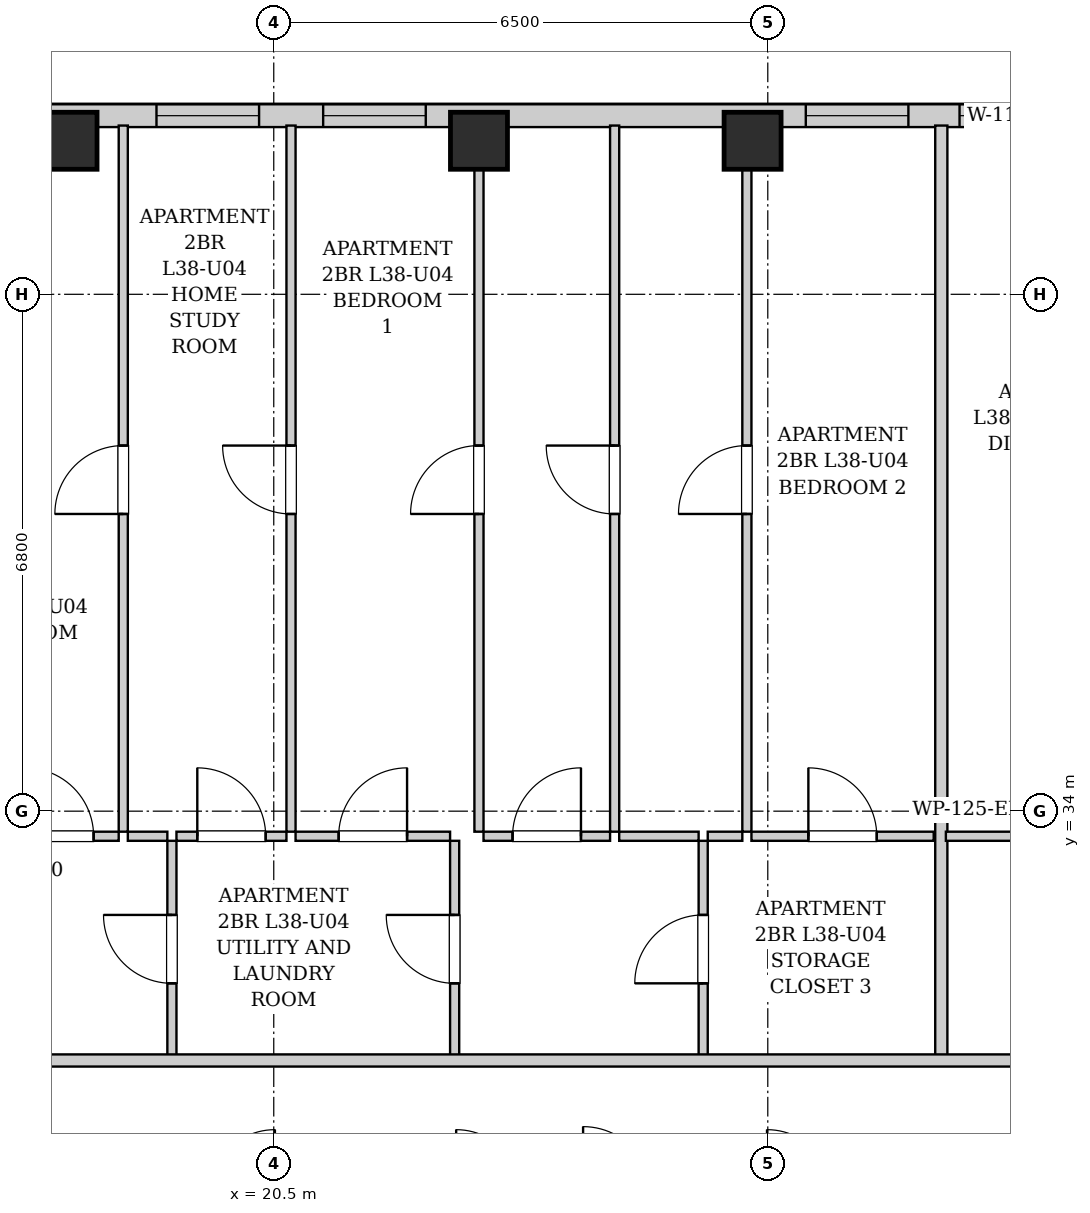
"""IFC4 building model, lengths in metres.
Left out: names, types, materials, properties, quantities, classifications, styles, units other than length and angle.
Written with IfcOpenShell. Run it as: python <this file> out.ifc"""

import sys

from ifc_helpers import new_model, si_unit, direction, frame, frame_2d, origin, origin_2d, place, context, subcontext, project, spatial, rectangle, extrude, element, fill, save


model = new_model("IFC4")
c1 = context("Model", 3, precision=1e-05, world=origin(), true_north=direction((0.0, 1.0)))
c2 = subcontext(c1, "Body", "Model", "MODEL_VIEW")
j1 = project(units=[si_unit("LENGTHUNIT", "METRE"), si_unit("PLANEANGLEUNIT", "RADIAN")], contexts=[c1])
p1 = place(None, origin())
s1 = spatial("IfcSite", under=j1, at=p1, CompositionType="ELEMENT")
p2 = place(p1, origin())
s2 = spatial("IfcBuilding", under=s1, at=p2, CompositionType="ELEMENT")
p3 = place(p2, frame((0.0, 0.0, 134.15)))
s3 = spatial("IfcBuildingStorey", under=s2, at=p3, CompositionType="ELEMENT", Elevation=134.15)
for number, where, z_axis, x_axis in (
    (1, (17.8, 42.82, 0.0), (0.0, 0.0, 1.0), (1.0, 0.0, 0.0)),
    (2, (23.2, 42.82, 0.0), (0.0, 0.0, 1.0), (1.0, 0.0, 0.0)),
    (3, (26.8, 42.82, 0.0), (0.0, 0.0, 1.0), (1.0, 0.0, 0.0)),
):
    element("IfcColumn", number, at=place(p3, frame(where, z_axis=z_axis, x_axis=x_axis)), inside=s3, PredefinedType="COLUMN", context=c2, shape_type="SweptSolid", body=[
        extrude(rectangle(XDim=0.75, YDim=0.75, at=origin_2d()), origin(), (0.0, 0.0, 1.0), 3.25),
    ])
p4 = place(p3, frame((16.6, 43.15, 0.0), z_axis=(0.0, 0.0, 1.0), x_axis=(1.0, 0.0, 0.0)))
e4 = element("IfcWall", 4, at=p4, inside=s3, PredefinedType="SOLIDWALL", context=c2, shape_type="SweptSolid", body=[
    extrude(rectangle(XDim=14.1, YDim=0.3, at=frame_2d((7.05, 0.0))), origin(), (0.0, 0.0, 1.0), 2.99),
])
p5 = place(p4, frame((2.357, 0.0, 0.55)))
e5 = element("IfcOpeningElement", 5, at=p5, cuts=e4, PredefinedType="OPENING", context=c2, shape_type="SweptSolid", body=[
    extrude(rectangle(XDim=1.35, YDim=1.2, at=frame_2d((0.675, 0.6))), frame((0.0, 0.16, 0.0), z_axis=(0.0, -1.0, 0.0), x_axis=(1.0, 0.0, 0.0)), (0.0, 0.0, 1.0), 0.32),
])
p6 = place(p4, frame((4.55, 0.0, 0.55)))
e6 = element("IfcOpeningElement", 6, at=p6, cuts=e4, PredefinedType="OPENING", context=c2, shape_type="SweptSolid", body=[
    extrude(rectangle(XDim=1.35, YDim=1.2, at=frame_2d((0.675, 0.6))), frame((0.0, 0.16, 0.0), z_axis=(0.0, -1.0, 0.0), x_axis=(1.0, 0.0, 0.0)), (0.0, 0.0, 1.0), 0.32),
])
p7 = place(p4, frame((10.9, 0.0, 0.55)))
e7 = element("IfcOpeningElement", 7, at=p7, cuts=e4, PredefinedType="OPENING", context=c2, shape_type="SweptSolid", body=[
    extrude(rectangle(XDim=1.35, YDim=1.2, at=frame_2d((0.675, 0.6))), frame((0.0, 0.16, 0.0), z_axis=(0.0, -1.0, 0.0), x_axis=(1.0, 0.0, 0.0)), (0.0, 0.0, 1.0), 0.32),
])
p8 = place(p4, frame((12.923, 0.0, 0.55)))
e8 = element("IfcOpeningElement", 8, at=p8, cuts=e4, PredefinedType="OPENING", context=c2, shape_type="SweptSolid", body=[
    extrude(rectangle(XDim=0.85, YDim=1.2, at=frame_2d((0.425, 0.6))), frame((0.0, 0.16, 0.0), z_axis=(0.0, -1.0, 0.0), x_axis=(1.0, 0.0, 0.0)), (0.0, 0.0, 1.0), 0.32),
])
p9 = place(p3, frame((19.16, 30.76, 0.0), z_axis=(0.0, 0.0, 1.0), x_axis=(0.0, 1.0, 0.0)))
e9 = element("IfcWall", 9, at=p9, inside=s3, PredefinedType="PARTITIONING", context=c2, shape_type="SweptSolid", body=[
    extrude(rectangle(XDim=2.85, YDim=0.12, at=frame_2d((1.425, 0.0))), origin(), (0.0, 0.0, 1.0), 2.99),
])
p10 = place(p9, frame((0.975, 0.0, 0.0)))
e10 = element("IfcOpeningElement", 10, at=p10, cuts=e9, PredefinedType="OPENING", context=c2, shape_type="SweptSolid", body=[
    extrude(rectangle(XDim=0.9, YDim=2.05, at=frame_2d((0.45, 1.025))), frame((0.0, 0.07, 0.0), z_axis=(0.0, -1.0, 0.0), x_axis=(1.0, 0.0, 0.0)), (0.0, 0.0, 1.0), 0.14),
])
p11 = place(p3, frame((16.9, 33.67, 0.0), z_axis=(0.0, 0.0, 1.0), x_axis=(1.0, 0.0, 0.0)))
e11 = element("IfcWall", 11, at=p11, inside=s3, PredefinedType="PARTITIONING", context=c2, shape_type="SweptSolid", body=[
    extrude(rectangle(XDim=1.56, YDim=0.12, at=frame_2d((0.78, 0.0))), origin(), (0.0, 0.0, 1.0), 2.99),
])
p12 = place(p11, frame((0.33, 0.0, 0.0)))
e12 = element("IfcOpeningElement", 12, at=p12, cuts=e11, PredefinedType="OPENING", context=c2, shape_type="SweptSolid", body=[
    extrude(rectangle(XDim=0.9, YDim=2.05, at=frame_2d((0.45, 1.025))), frame((0.0, 0.07, 0.0), z_axis=(0.0, -1.0, 0.0), x_axis=(1.0, 0.0, 0.0)), (0.0, 0.0, 1.0), 0.14),
])
p13 = place(p3, frame((18.58, 33.67, 0.0), z_axis=(0.0, 0.0, 1.0), x_axis=(1.0, 0.0, 0.0)))
e13 = element("IfcWall", 13, at=p13, inside=s3, PredefinedType="PARTITIONING", context=c2, shape_type="SweptSolid", body=[
    extrude(rectangle(XDim=0.52, YDim=0.12, at=frame_2d((0.26, 0.0))), origin(), (0.0, 0.0, 1.0), 2.99),
])
p14 = place(p3, frame((22.88, 30.76, 0.0), z_axis=(0.0, 0.0, 1.0), x_axis=(0.0, 1.0, 0.0)))
e14 = element("IfcWall", 14, at=p14, inside=s3, PredefinedType="PARTITIONING", context=c2, shape_type="SweptSolid", body=[
    extrude(rectangle(XDim=2.85, YDim=0.12, at=frame_2d((1.425, 0.0))), origin(), (0.0, 0.0, 1.0), 2.99),
])
p15 = place(p14, frame((0.975, 0.0, 0.0)))
e15 = element("IfcOpeningElement", 15, at=p15, cuts=e14, PredefinedType="OPENING", context=c2, shape_type="SweptSolid", body=[
    extrude(rectangle(XDim=0.9, YDim=2.05, at=frame_2d((0.45, 1.025))), frame((0.0, 0.07, 0.0), z_axis=(0.0, -1.0, 0.0), x_axis=(1.0, 0.0, 0.0)), (0.0, 0.0, 1.0), 0.14),
])
p16 = place(p3, frame((19.22, 33.67, 0.0), z_axis=(0.0, 0.0, 1.0), x_axis=(1.0, 0.0, 0.0)))
e16 = element("IfcWall", 16, at=p16, inside=s3, PredefinedType="PARTITIONING", context=c2, shape_type="SweptSolid", body=[
    extrude(rectangle(XDim=1.447, YDim=0.12, at=frame_2d((0.724, 0.0))), origin(), (0.0, 0.0, 1.0), 2.99),
])
p17 = place(p16, frame((0.274, 0.0, 0.0)))
e17 = element("IfcOpeningElement", 17, at=p17, cuts=e16, PredefinedType="OPENING", context=c2, shape_type="SweptSolid", body=[
    extrude(rectangle(XDim=0.9, YDim=2.05, at=frame_2d((0.45, 1.025))), frame((0.0, 0.07, 0.0), z_axis=(0.0, -1.0, 0.0), x_axis=(1.0, 0.0, 0.0)), (0.0, 0.0, 1.0), 0.14),
])
p18 = place(p3, frame((20.787, 33.67, 0.0), z_axis=(0.0, 0.0, 1.0), x_axis=(1.0, 0.0, 0.0)))
e18 = element("IfcWall", 18, at=p18, inside=s3, PredefinedType="PARTITIONING", context=c2, shape_type="SweptSolid", body=[
    extrude(rectangle(XDim=2.033, YDim=0.12, at=frame_2d((1.017, 0.0))), origin(), (0.0, 0.0, 1.0), 2.99),
])
p19 = place(p18, frame((0.567, 0.0, 0.0)))
e19 = element("IfcOpeningElement", 19, at=p19, cuts=e18, PredefinedType="OPENING", context=c2, shape_type="SweptSolid", body=[
    extrude(rectangle(XDim=0.9, YDim=2.05, at=frame_2d((0.45, 1.025))), frame((0.0, 0.07, 0.0), z_axis=(0.0, -1.0, 0.0), x_axis=(1.0, 0.0, 0.0)), (0.0, 0.0, 1.0), 0.14),
])
p20 = place(p3, frame((26.15, 30.76, 0.0), z_axis=(0.0, 0.0, 1.0), x_axis=(0.0, 1.0, 0.0)))
e20 = element("IfcWall", 20, at=p20, inside=s3, PredefinedType="PARTITIONING", context=c2, shape_type="SweptSolid", body=[
    extrude(rectangle(XDim=2.85, YDim=0.12, at=frame_2d((1.425, 0.0))), origin(), (0.0, 0.0, 1.0), 2.99),
])
p21 = place(p20, frame((0.975, 0.0, 0.0)))
e21 = element("IfcOpeningElement", 21, at=p21, cuts=e20, PredefinedType="OPENING", context=c2, shape_type="SweptSolid", body=[
    extrude(rectangle(XDim=0.9, YDim=2.05, at=frame_2d((0.45, 1.025))), frame((0.0, 0.07, 0.0), z_axis=(0.0, -1.0, 0.0), x_axis=(1.0, 0.0, 0.0)), (0.0, 0.0, 1.0), 0.14),
])
p22 = place(p3, frame((23.26, 33.67, 0.0), z_axis=(0.0, 0.0, 1.0), x_axis=(1.0, 0.0, 0.0)))
e22 = element("IfcWall", 22, at=p22, inside=s3, PredefinedType="PARTITIONING", context=c2, shape_type="SweptSolid", body=[
    extrude(rectangle(XDim=1.665, YDim=0.12, at=frame_2d((0.833, 0.0))), origin(), (0.0, 0.0, 1.0), 2.99),
])
p23 = place(p22, frame((0.382, 0.0, 0.0)))
e23 = element("IfcOpeningElement", 23, at=p23, cuts=e22, PredefinedType="OPENING", context=c2, shape_type="SweptSolid", body=[
    extrude(rectangle(XDim=0.9, YDim=2.05, at=frame_2d((0.45, 1.025))), frame((0.0, 0.07, 0.0), z_axis=(0.0, -1.0, 0.0), x_axis=(1.0, 0.0, 0.0)), (0.0, 0.0, 1.0), 0.14),
])
p24 = place(p3, frame((25.045, 33.67, 0.0), z_axis=(0.0, 0.0, 1.0), x_axis=(1.0, 0.0, 0.0)))
e24 = element("IfcWall", 24, at=p24, inside=s3, PredefinedType="PARTITIONING", context=c2, shape_type="SweptSolid", body=[
    extrude(rectangle(XDim=1.045, YDim=0.12, at=frame_2d((0.522, 0.0))), origin(), (0.0, 0.0, 1.0), 2.99),
])
p25 = place(p3, frame((26.21, 33.67, 0.0), z_axis=(0.0, 0.0, 1.0), x_axis=(1.0, 0.0, 0.0)))
e25 = element("IfcWall", 25, at=p25, inside=s3, PredefinedType="PARTITIONING", context=c2, shape_type="SweptSolid", body=[
    extrude(rectangle(XDim=0.455, YDim=0.12, at=frame_2d((0.228, 0.0))), origin(), (0.0, 0.0, 1.0), 2.99),
])
p26 = place(p3, frame((26.785, 33.67, 0.0), z_axis=(0.0, 0.0, 1.0), x_axis=(1.0, 0.0, 0.0)))
e26 = element("IfcWall", 26, at=p26, inside=s3, PredefinedType="PARTITIONING", context=c2, shape_type="SweptSolid", body=[
    extrude(rectangle(XDim=2.398, YDim=0.12, at=frame_2d((1.199, 0.0))), origin(), (0.0, 0.0, 1.0), 2.99),
])
p27 = place(p26, frame((0.749, 0.0, 0.0)))
e27 = element("IfcOpeningElement", 27, at=p27, cuts=e26, PredefinedType="OPENING", context=c2, shape_type="SweptSolid", body=[
    extrude(rectangle(XDim=0.9, YDim=2.05, at=frame_2d((0.45, 1.025))), frame((0.0, 0.07, 0.0), z_axis=(0.0, -1.0, 0.0), x_axis=(1.0, 0.0, 0.0)), (0.0, 0.0, 1.0), 0.14),
])
p28 = place(p3, frame((18.52, 33.73, 0.0), z_axis=(0.0, 0.0, 1.0), x_axis=(0.0, 1.0, 0.0)))
e28 = element("IfcWall", 28, at=p28, inside=s3, PredefinedType="PARTITIONING", context=c2, shape_type="SweptSolid", body=[
    extrude(rectangle(XDim=9.29, YDim=0.12, at=frame_2d((4.645, 0.0))), origin(), (0.0, 0.0, 1.0), 2.99),
])
p29 = place(p28, frame((4.18, 0.0, 0.0)))
e29 = element("IfcOpeningElement", 29, at=p29, cuts=e28, PredefinedType="OPENING", context=c2, shape_type="SweptSolid", body=[
    extrude(rectangle(XDim=0.9, YDim=2.05, at=frame_2d((0.45, 1.025))), frame((0.0, 0.07, 0.0), z_axis=(0.0, -1.0, 0.0), x_axis=(1.0, 0.0, 0.0)), (0.0, 0.0, 1.0), 0.14),
])
p30 = place(p3, frame((20.727, 33.73, 0.0), z_axis=(0.0, 0.0, 1.0), x_axis=(0.0, 1.0, 0.0)))
e30 = element("IfcWall", 30, at=p30, inside=s3, PredefinedType="PARTITIONING", context=c2, shape_type="SweptSolid", body=[
    extrude(rectangle(XDim=9.29, YDim=0.12, at=frame_2d((4.645, 0.0))), origin(), (0.0, 0.0, 1.0), 2.99),
])
p31 = place(p30, frame((4.18, 0.0, 0.0)))
e31 = element("IfcOpeningElement", 31, at=p31, cuts=e30, PredefinedType="OPENING", context=c2, shape_type="SweptSolid", body=[
    extrude(rectangle(XDim=0.9, YDim=2.05, at=frame_2d((0.45, 1.025))), frame((0.0, 0.07, 0.0), z_axis=(0.0, -1.0, 0.0), x_axis=(1.0, 0.0, 0.0)), (0.0, 0.0, 1.0), 0.14),
])
p32 = place(p3, frame((23.2, 33.73, 0.0), z_axis=(0.0, 0.0, 1.0), x_axis=(0.0, 1.0, 0.0)))
e32 = element("IfcWall", 32, at=p32, inside=s3, PredefinedType="PARTITIONING", context=c2, shape_type="SweptSolid", body=[
    extrude(rectangle(XDim=9.29, YDim=0.12, at=frame_2d((4.645, 0.0))), origin(), (0.0, 0.0, 1.0), 2.99),
])
p33 = place(p32, frame((4.18, 0.0, 0.0)))
e33 = element("IfcOpeningElement", 33, at=p33, cuts=e32, PredefinedType="OPENING", context=c2, shape_type="SweptSolid", body=[
    extrude(rectangle(XDim=0.9, YDim=2.05, at=frame_2d((0.45, 1.025))), frame((0.0, 0.07, 0.0), z_axis=(0.0, -1.0, 0.0), x_axis=(1.0, 0.0, 0.0)), (0.0, 0.0, 1.0), 0.14),
])
p34 = place(p3, frame((24.985, 33.73, 0.0), z_axis=(0.0, 0.0, 1.0), x_axis=(0.0, 1.0, 0.0)))
e34 = element("IfcWall", 34, at=p34, inside=s3, PredefinedType="PARTITIONING", context=c2, shape_type="SweptSolid", body=[
    extrude(rectangle(XDim=9.29, YDim=0.12, at=frame_2d((4.645, 0.0))), origin(), (0.0, 0.0, 1.0), 2.99),
])
p35 = place(p34, frame((4.18, 0.0, 0.0)))
e35 = element("IfcOpeningElement", 35, at=p35, cuts=e34, PredefinedType="OPENING", context=c2, shape_type="SweptSolid", body=[
    extrude(rectangle(XDim=0.9, YDim=2.05, at=frame_2d((0.45, 1.025))), frame((0.0, 0.07, 0.0), z_axis=(0.0, -1.0, 0.0), x_axis=(1.0, 0.0, 0.0)), (0.0, 0.0, 1.0), 0.14),
])
p36 = place(p3, frame((26.725, 33.73, 0.0), z_axis=(0.0, 0.0, 1.0), x_axis=(0.0, 1.0, 0.0)))
e36 = element("IfcWall", 36, at=p36, inside=s3, PredefinedType="PARTITIONING", context=c2, shape_type="SweptSolid", body=[
    extrude(rectangle(XDim=9.29, YDim=0.12, at=frame_2d((4.645, 0.0))), origin(), (0.0, 0.0, 1.0), 2.99),
])
p37 = place(p36, frame((4.18, 0.0, 0.0)))
e37 = element("IfcOpeningElement", 37, at=p37, cuts=e36, PredefinedType="OPENING", context=c2, shape_type="SweptSolid", body=[
    extrude(rectangle(XDim=0.9, YDim=2.05, at=frame_2d((0.45, 1.025))), frame((0.0, 0.07, 0.0), z_axis=(0.0, -1.0, 0.0), x_axis=(1.0, 0.0, 0.0)), (0.0, 0.0, 1.0), 0.14),
])
p38 = place(p3, frame((29.283, 30.76, 0.0), z_axis=(0.0, 0.0, 1.0), x_axis=(0.0, 1.0, 0.0)))
e38 = element("IfcWall", 38, at=p38, inside=s3, PredefinedType="PARTITIONING", context=c2, shape_type="SweptSolid", body=[
    extrude(rectangle(XDim=12.26, YDim=0.16, at=frame_2d((6.13, 0.0))), origin(), (0.0, 0.0, 1.0), 2.99),
])
p39 = place(p3, frame((29.343, 33.67, 0.0), z_axis=(0.0, 0.0, 1.0), x_axis=(1.0, 0.0, 0.0)))
e39 = element("IfcWall", 39, at=p39, inside=s3, PredefinedType="PARTITIONING", context=c2, shape_type="SweptSolid", body=[
    extrude(rectangle(XDim=2.4, YDim=0.12, at=frame_2d((1.2, 0.0))), origin(), (0.0, 0.0, 1.0), 2.99),
])
p40 = place(p3, frame((10.05, 30.72, 0.0), z_axis=(0.0, 0.0, 1.0), x_axis=(1.0, 0.0, 0.0)))
e40 = element("IfcWall", 40, at=p40, inside=s3, PredefinedType="PARTITIONING", context=c2, shape_type="SweptSolid", body=[
    extrude(rectangle(XDim=27.7, YDim=0.16, at=frame_2d((13.85, 0.0))), origin(), (0.0, 0.0, 1.0), 2.99),
])
p41 = place(p40, frame((4.165, 0.0, 0.0)))
e41 = element("IfcOpeningElement", 41, at=p41, cuts=e40, PredefinedType="OPENING", context=c2, shape_type="SweptSolid", body=[
    extrude(rectangle(XDim=0.95, YDim=2.1, at=frame_2d((0.475, 1.05))), frame((0.0, 0.09, 0.0), z_axis=(0.0, -1.0, 0.0), x_axis=(1.0, 0.0, 0.0)), (0.0, 0.0, 1.0), 0.18),
])
p42 = place(p40, frame((23.785, 0.0, 0.0)))
e42 = element("IfcOpeningElement", 42, at=p42, cuts=e40, PredefinedType="OPENING", context=c2, shape_type="SweptSolid", body=[
    extrude(rectangle(XDim=0.95, YDim=2.1, at=frame_2d((0.475, 1.05))), frame((0.0, 0.09, 0.0), z_axis=(0.0, -1.0, 0.0), x_axis=(1.0, 0.0, 0.0)), (0.0, 0.0, 1.0), 0.18),
])
p43 = place(p10, origin())
e43 = element("IfcDoor", 43, at=p43, inside=s3, OperationType="SINGLE_SWING_RIGHT", PredefinedType="DOOR", context=c2, shape_type="SweptSolid", body=[
    extrude(rectangle(XDim=0.9, YDim=2.05, at=frame_2d((0.45, 1.025))), frame((0.0, 0.025, 0.0), z_axis=(0.0, -1.0, 0.0), x_axis=(1.0, 0.0, 0.0)), (0.0, 0.0, 1.0), 0.05),
])
fill(e10, e43)
p44 = place(p12, origin())
e44 = element("IfcDoor", 44, at=p44, inside=s3, OperationType="SINGLE_SWING_LEFT", PredefinedType="DOOR", context=c2, shape_type="SweptSolid", body=[
    extrude(rectangle(XDim=0.9, YDim=2.05, at=frame_2d((0.45, 1.025))), frame((0.0, 0.025, 0.0), z_axis=(0.0, -1.0, 0.0), x_axis=(1.0, 0.0, 0.0)), (0.0, 0.0, 1.0), 0.05),
])
fill(e12, e44)
p45 = place(p15, origin())
e45 = element("IfcDoor", 45, at=p45, inside=s3, OperationType="SINGLE_SWING_RIGHT", PredefinedType="DOOR", context=c2, shape_type="SweptSolid", body=[
    extrude(rectangle(XDim=0.9, YDim=2.05, at=frame_2d((0.45, 1.025))), frame((0.0, 0.025, 0.0), z_axis=(0.0, -1.0, 0.0), x_axis=(1.0, 0.0, 0.0)), (0.0, 0.0, 1.0), 0.05),
])
fill(e15, e45)
p46 = place(p17, origin())
e46 = element("IfcDoor", 46, at=p46, inside=s3, OperationType="SINGLE_SWING_LEFT", PredefinedType="DOOR", context=c2, shape_type="SweptSolid", body=[
    extrude(rectangle(XDim=0.9, YDim=2.05, at=frame_2d((0.45, 1.025))), frame((0.0, 0.025, 0.0), z_axis=(0.0, -1.0, 0.0), x_axis=(1.0, 0.0, 0.0)), (0.0, 0.0, 1.0), 0.05),
])
fill(e17, e46)
p47 = place(p19, origin())
e47 = element("IfcDoor", 47, at=p47, inside=s3, OperationType="SINGLE_SWING_RIGHT", PredefinedType="DOOR", context=c2, shape_type="SweptSolid", body=[
    extrude(rectangle(XDim=0.9, YDim=2.05, at=frame_2d((0.45, 1.025))), frame((0.0, 0.025, 0.0), z_axis=(0.0, -1.0, 0.0), x_axis=(1.0, 0.0, 0.0)), (0.0, 0.0, 1.0), 0.05),
])
fill(e19, e47)
p48 = place(p21, origin())
e48 = element("IfcDoor", 48, at=p48, inside=s3, OperationType="SINGLE_SWING_LEFT", PredefinedType="DOOR", context=c2, shape_type="SweptSolid", body=[
    extrude(rectangle(XDim=0.9, YDim=2.05, at=frame_2d((0.45, 1.025))), frame((0.0, 0.025, 0.0), z_axis=(0.0, -1.0, 0.0), x_axis=(1.0, 0.0, 0.0)), (0.0, 0.0, 1.0), 0.05),
])
fill(e21, e48)
p49 = place(p23, origin())
e49 = element("IfcDoor", 49, at=p49, inside=s3, OperationType="SINGLE_SWING_RIGHT", PredefinedType="DOOR", context=c2, shape_type="SweptSolid", body=[
    extrude(rectangle(XDim=0.9, YDim=2.05, at=frame_2d((0.45, 1.025))), frame((0.0, 0.025, 0.0), z_axis=(0.0, -1.0, 0.0), x_axis=(1.0, 0.0, 0.0)), (0.0, 0.0, 1.0), 0.05),
])
fill(e23, e49)
p50 = place(p27, origin())
e50 = element("IfcDoor", 50, at=p50, inside=s3, OperationType="SINGLE_SWING_LEFT", PredefinedType="DOOR", context=c2, shape_type="SweptSolid", body=[
    extrude(rectangle(XDim=0.9, YDim=2.05, at=frame_2d((0.45, 1.025))), frame((0.0, 0.025, 0.0), z_axis=(0.0, -1.0, 0.0), x_axis=(1.0, 0.0, 0.0)), (0.0, 0.0, 1.0), 0.05),
])
fill(e27, e50)
p51 = place(p29, origin())
e51 = element("IfcDoor", 51, at=p51, inside=s3, OperationType="SINGLE_SWING_LEFT", PredefinedType="DOOR", context=c2, shape_type="SweptSolid", body=[
    extrude(rectangle(XDim=0.9, YDim=2.05, at=frame_2d((0.45, 1.025))), frame((0.0, 0.025, 0.0), z_axis=(0.0, -1.0, 0.0), x_axis=(1.0, 0.0, 0.0)), (0.0, 0.0, 1.0), 0.05),
])
fill(e29, e51)
p52 = place(p31, origin())
e52 = element("IfcDoor", 52, at=p52, inside=s3, OperationType="SINGLE_SWING_RIGHT", PredefinedType="DOOR", context=c2, shape_type="SweptSolid", body=[
    extrude(rectangle(XDim=0.9, YDim=2.05, at=frame_2d((0.45, 1.025))), frame((0.0, 0.025, 0.0), z_axis=(0.0, -1.0, 0.0), x_axis=(1.0, 0.0, 0.0)), (0.0, 0.0, 1.0), 0.05),
])
fill(e31, e52)
p53 = place(p33, origin())
e53 = element("IfcDoor", 53, at=p53, inside=s3, OperationType="SINGLE_SWING_LEFT", PredefinedType="DOOR", context=c2, shape_type="SweptSolid", body=[
    extrude(rectangle(XDim=0.9, YDim=2.05, at=frame_2d((0.45, 1.025))), frame((0.0, 0.025, 0.0), z_axis=(0.0, -1.0, 0.0), x_axis=(1.0, 0.0, 0.0)), (0.0, 0.0, 1.0), 0.05),
])
fill(e33, e53)
p54 = place(p35, origin())
e54 = element("IfcDoor", 54, at=p54, inside=s3, OperationType="SINGLE_SWING_RIGHT", PredefinedType="DOOR", context=c2, shape_type="SweptSolid", body=[
    extrude(rectangle(XDim=0.9, YDim=2.05, at=frame_2d((0.45, 1.025))), frame((0.0, 0.025, 0.0), z_axis=(0.0, -1.0, 0.0), x_axis=(1.0, 0.0, 0.0)), (0.0, 0.0, 1.0), 0.05),
])
fill(e35, e54)
p55 = place(p37, origin())
e55 = element("IfcDoor", 55, at=p55, inside=s3, OperationType="SINGLE_SWING_LEFT", PredefinedType="DOOR", context=c2, shape_type="SweptSolid", body=[
    extrude(rectangle(XDim=0.9, YDim=2.05, at=frame_2d((0.45, 1.025))), frame((0.0, 0.025, 0.0), z_axis=(0.0, -1.0, 0.0), x_axis=(1.0, 0.0, 0.0)), (0.0, 0.0, 1.0), 0.05),
])
fill(e37, e55)
p56 = place(p5, origin())
e56 = element("IfcWindow", 56, at=p56, inside=s3, PartitioningType="SINGLE_PANEL", PredefinedType="WINDOW", context=c2, shape_type="SweptSolid", body=[
    extrude(rectangle(XDim=1.35, YDim=1.2, at=frame_2d((0.675, 0.6))), frame((0.0, 0.03, 0.0), z_axis=(0.0, -1.0, 0.0), x_axis=(1.0, 0.0, 0.0)), (0.0, 0.0, 1.0), 0.06),
])
fill(e5, e56)
p57 = place(p6, origin())
e57 = element("IfcWindow", 57, at=p57, inside=s3, PartitioningType="SINGLE_PANEL", PredefinedType="WINDOW", context=c2, shape_type="SweptSolid", body=[
    extrude(rectangle(XDim=1.35, YDim=1.2, at=frame_2d((0.675, 0.6))), frame((0.0, 0.03, 0.0), z_axis=(0.0, -1.0, 0.0), x_axis=(1.0, 0.0, 0.0)), (0.0, 0.0, 1.0), 0.06),
])
fill(e6, e57)
p58 = place(p7, origin())
e58 = element("IfcWindow", 58, at=p58, inside=s3, PartitioningType="SINGLE_PANEL", PredefinedType="WINDOW", context=c2, shape_type="SweptSolid", body=[
    extrude(rectangle(XDim=1.35, YDim=1.2, at=frame_2d((0.675, 0.6))), frame((0.0, 0.03, 0.0), z_axis=(0.0, -1.0, 0.0), x_axis=(1.0, 0.0, 0.0)), (0.0, 0.0, 1.0), 0.06),
])
fill(e7, e58)
p59 = place(p8, origin())
e59 = element("IfcWindow", 59, at=p59, inside=s3, PartitioningType="SINGLE_PANEL", PredefinedType="WINDOW", context=c2, shape_type="SweptSolid", body=[
    extrude(rectangle(XDim=0.85, YDim=1.2, at=frame_2d((0.425, 0.6))), frame((0.0, 0.03, 0.0), z_axis=(0.0, -1.0, 0.0), x_axis=(1.0, 0.0, 0.0)), (0.0, 0.0, 1.0), 0.06),
])
fill(e8, e59)
save(model, sys.argv[1])
